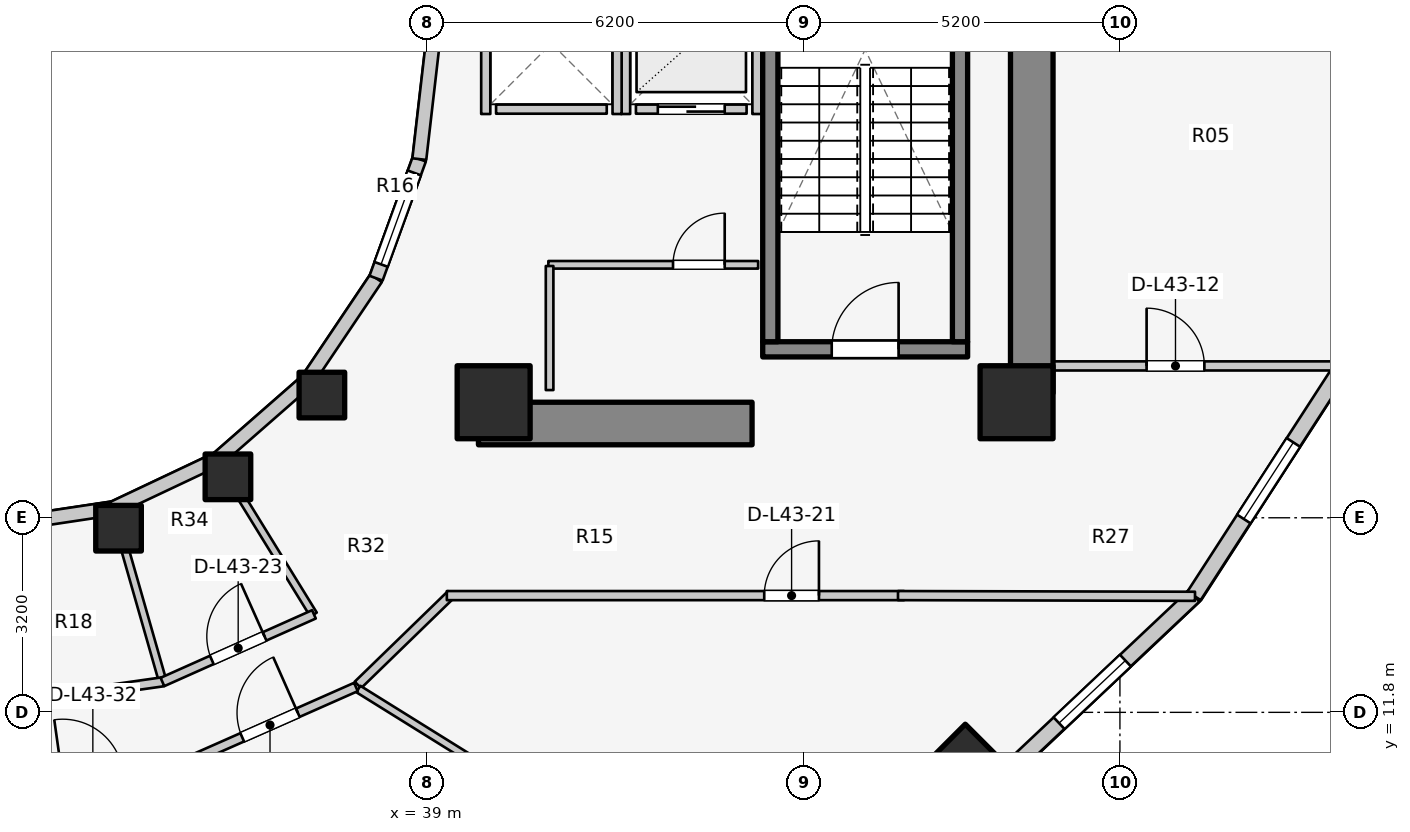
"""IFC4 building model, lengths in metres.
Left out: names, types, materials, properties, quantities, classifications, styles, units other than length and angle.
Written with IfcOpenShell. Run it as: python <this file> out.ifc"""

import sys

from ifc_helpers import new_model, si_unit, direction, frame, frame_2d, origin, origin_2d, place, context, subcontext, project, spatial, rectangle, extrude, element, fill, save


model = new_model("IFC4")
c1 = context("Model", 3, precision=1e-05, world=origin(), true_north=direction((0.0, 1.0)))
c2 = subcontext(c1, "Body", "Model", "MODEL_VIEW")
j1 = project(units=[si_unit("LENGTHUNIT", "METRE"), si_unit("PLANEANGLEUNIT", "RADIAN")], contexts=[c1])
p1 = place(None, origin())
s1 = spatial("IfcSite", under=j1, at=p1, CompositionType="ELEMENT")
p2 = place(p1, origin())
s2 = spatial("IfcBuilding", under=s1, at=p2, CompositionType="ELEMENT")
p3 = place(p2, frame((0.0, 0.0, 143.6)))
s3 = spatial("IfcBuildingStorey", under=s2, at=p3, CompositionType="ELEMENT", Elevation=143.6)
p4 = place(p3, frame((48.95, 17.05, 0.0), z_axis=(0.0, 0.0, 1.0), x_axis=(0.0, 1.0, 0.0)))
e1 = element("IfcWall", 1, at=p4, inside=s3, PredefinedType="SHEAR", context=c2, shape_type="SweptSolid", body=[
    extrude(rectangle(XDim=12.8, YDim=0.7, at=frame_2d((6.4, 0.0))), origin(), (0.0, 0.0, 1.0), 3.1),
])
p5 = place(p3, frame((39.85, 16.55, 0.0), z_axis=(0.0, 0.0, 1.0), x_axis=(1.0, 0.0, 0.0)))
e2 = element("IfcWall", 2, at=p5, inside=s3, PredefinedType="SHEAR", context=c2, shape_type="SweptSolid", body=[
    extrude(rectangle(XDim=4.5, YDim=0.7, at=frame_2d((2.25, 0.0))), origin(), (0.0, 0.0, 1.0), 3.1),
])
p6 = place(p3, frame((44.525, 17.77, 0.0), z_axis=(0.0, 0.0, 1.0), x_axis=(1.0, 0.0, 0.0)))
e3 = element("IfcWall", 3, at=p6, inside=s3, PredefinedType="SOLIDWALL", context=c2, shape_type="SweptSolid", body=[
    extrude(rectangle(XDim=3.37, YDim=0.25, at=frame_2d((1.685, 0.0))), origin(), (0.0, 0.0, 1.0), 3.1),
])
p7 = place(p6, frame((1.135, 0.0, 0.0)))
e4 = element("IfcOpeningElement", 4, at=p7, cuts=e3, PredefinedType="OPENING", context=c2, shape_type="SweptSolid", body=[
    extrude(rectangle(XDim=1.1, YDim=2.1, at=frame_2d((0.55, 1.05))), frame((0.0, 0.135, 0.0), z_axis=(0.0, -1.0, 0.0), x_axis=(1.0, 0.0, 0.0)), (0.0, 0.0, 1.0), 0.27),
])
for number, where, z_axis, x_axis in (
    (5, (44.65, 17.895, 0.0), (0.0, 0.0, 1.0), (0.0, 1.0, 0.0)),
    (6, (47.77, 17.895, 0.0), (0.0, 0.0, 1.0), (0.0, 1.0, 0.0)),
):
    element("IfcWall", number, at=place(p3, frame(where, z_axis=z_axis, x_axis=x_axis)), inside=s3, PredefinedType="SOLIDWALL", context=c2, shape_type="SweptSolid", body=[
        extrude(rectangle(XDim=7.81, YDim=0.25, at=frame_2d((3.905, 0.0))), origin(), (0.0, 0.0, 1.0), 3.1),
    ])
for number, where, z_axis, x_axis in (
    (7, (40.1, 16.9, 0.0), (0.0, 0.0, 1.0), (1.0, 0.0, 0.0)),
    (8, (48.7, 16.9, 0.0), (0.0, 0.0, 1.0), (1.0, 0.0, 0.0)),
):
    element("IfcColumn", number, at=place(p3, frame(where, z_axis=z_axis, x_axis=x_axis)), inside=s3, PredefinedType="COLUMN", context=c2, shape_type="SweptSolid", body=[
        extrude(rectangle(XDim=1.2, YDim=1.2, at=origin_2d()), origin(), (0.0, 0.0, 1.0), 3.1),
    ])
for number, where, z_axis, x_axis in (
    (9, (33.931, 14.828, 0.0), (0.0, 0.0, 1.0), (1.0, 0.0, 0.0)),
    (10, (35.73, 15.673, 0.0), (0.0, 0.0, 1.0), (1.0, 0.0, 0.0)),
    (11, (37.275, 17.018, 0.0), (0.0, 0.0, 1.0), (1.0, 0.0, 0.0)),
):
    element("IfcColumn", number, at=place(p3, frame(where, z_axis=z_axis, x_axis=x_axis)), inside=s3, PredefinedType="COLUMN", context=c2, shape_type="SweptSolid", body=[
        extrude(rectangle(XDim=0.75, YDim=0.75, at=origin_2d()), origin(), (0.0, 0.0, 1.0), 3.1),
    ])
p8 = place(p3, frame((47.857, 10.969, 0.0), z_axis=(0.0, 0.0, 1.0), x_axis=(0.707106781187, -0.707106781187, 0.0)))
e12 = element("IfcColumn", 12, at=p8, inside=s3, PredefinedType="COLUMN", context=c2, shape_type="SweptSolid", body=[
    extrude(rectangle(XDim=0.9, YDim=0.9, at=origin_2d()), origin(), (0.0, 0.0, 1.0), 3.1),
])
p9 = place(p3, frame((32.0, 14.88, 0.0), z_axis=(0.0, 0.0, 1.0), x_axis=(0.988901730308, 0.148571086668, 0.0)))
e13 = element("IfcWall", 13, at=p9, inside=s3, PredefinedType="STANDARD", context=c2, shape_type="SweptSolid", body=[
    extrude(rectangle(XDim=1.864, YDim=0.23, at=frame_2d((0.932, 0.0))), origin(), (0.0, 0.0, 1.0), 2.16),
])
p10 = place(p3, frame((33.843, 15.157, 0.0), z_axis=(0.0, 0.0, 1.0), x_axis=(0.904179699603, 0.427152280606, 0.0)))
e14 = element("IfcWall", 14, at=p10, inside=s3, PredefinedType="STANDARD", context=c2, shape_type="SweptSolid", body=[
    extrude(rectangle(XDim=1.899, YDim=0.23, at=frame_2d((0.95, 0.0))), origin(), (0.0, 0.0, 1.0), 2.16),
])
p11 = place(p3, frame((35.56, 15.968, 0.0), z_axis=(0.0, 0.0, 1.0), x_axis=(0.752576694707, 0.658504607869, 0.0)))
e15 = element("IfcWall", 15, at=p11, inside=s3, PredefinedType="STANDARD", context=c2, shape_type="SweptSolid", body=[
    extrude(rectangle(XDim=1.959, YDim=0.23, at=frame_2d((0.98, 0.0))), origin(), (0.0, 0.0, 1.0), 2.16),
])
p12 = place(p3, frame((37.035, 17.258, 0.0), z_axis=(0.0, 0.0, 1.0), x_axis=(0.558197800898, 0.829707909492, 0.0)))
e16 = element("IfcWall", 16, at=p12, inside=s3, PredefinedType="STANDARD", context=c2, shape_type="SweptSolid", body=[
    extrude(rectangle(XDim=2.027, YDim=0.23, at=frame_2d((1.013, 0.0))), origin(), (0.0, 0.0, 1.0), 2.16),
])
p13 = place(p3, frame((38.166, 18.94, 0.0), z_axis=(0.0, 0.0, 1.0), x_axis=(0.341423187295, 0.93990968033, 0.0)))
e17 = element("IfcWall", 17, at=p13, inside=s3, PredefinedType="STANDARD", context=c2, shape_type="SweptSolid", body=[
    extrude(rectangle(XDim=2.084, YDim=0.23, at=frame_2d((1.042, 0.0))), origin(), (0.0, 0.0, 1.0), 2.84),
])
p14 = place(p13, frame((0.242, 0.0, 0.85)))
e18 = element("IfcOpeningElement", 18, at=p14, cuts=e17, PredefinedType="OPENING", context=c2, shape_type="SweptSolid", body=[
    extrude(rectangle(XDim=1.6, YDim=1.65, at=frame_2d((0.8, 0.825))), frame((0.0, 0.125, 0.0), z_axis=(0.0, -1.0, 0.0), x_axis=(1.0, 0.0, 0.0)), (0.0, 0.0, 1.0), 0.25),
])
p15 = place(p3, frame((38.877, 20.898, 0.0), z_axis=(0.0, 0.0, 1.0), x_axis=(0.114711713601, 0.993398823617, 0.0)))
e19 = element("IfcWall", 19, at=p15, inside=s3, PredefinedType="STANDARD", context=c2, shape_type="SweptSolid", body=[
    extrude(rectangle(XDim=2.115, YDim=0.23, at=frame_2d((1.058, 0.0))), origin(), (0.0, 0.0, 1.0), 2.84),
])
p16 = place(p3, frame((48.269, 10.559, 0.0), z_axis=(0.0, 0.0, 1.0), x_axis=(0.727667301037, 0.68593024354, 0.0)))
e20 = element("IfcWall", 20, at=p16, inside=s3, PredefinedType="STANDARD", context=c2, shape_type="SweptSolid", body=[
    extrude(rectangle(XDim=4.604, YDim=0.26, at=frame_2d((2.302, 0.0))), origin(), (0.0, 0.0, 1.0), 2.85),
])
p17 = place(p16, frame((1.552, 0.0, 0.75)))
e21 = element("IfcOpeningElement", 21, at=p17, cuts=e20, PredefinedType="OPENING", context=c2, shape_type="SweptSolid", body=[
    extrude(rectangle(XDim=1.5, YDim=1.6, at=frame_2d((0.75, 0.8))), frame((0.0, 0.14, 0.0), z_axis=(0.0, -1.0, 0.0), x_axis=(1.0, 0.0, 0.0)), (0.0, 0.0, 1.0), 0.28),
])
p18 = place(p3, frame((51.619, 13.716, 0.0), z_axis=(0.0, 0.0, 1.0), x_axis=(0.543358984534, 0.839500454989, 0.0)))
e22 = element("IfcWall", 22, at=p18, inside=s3, PredefinedType="STANDARD", context=c2, shape_type="SweptSolid", body=[
    extrude(rectangle(XDim=4.511, YDim=0.26, at=frame_2d((2.256, 0.0))), origin(), (0.0, 0.0, 1.0), 2.85),
])
p19 = place(p18, frame((1.506, 0.0, 0.75)))
e23 = element("IfcOpeningElement", 23, at=p19, cuts=e22, PredefinedType="OPENING", context=c2, shape_type="SweptSolid", body=[
    extrude(rectangle(XDim=1.5, YDim=1.6, at=frame_2d((0.75, 0.8))), frame((0.0, 0.14, 0.0), z_axis=(0.0, -1.0, 0.0), x_axis=(1.0, 0.0, 0.0)), (0.0, 0.0, 1.0), 0.28),
])
p20 = place(p3, frame((42.44, 21.72, 0.0), z_axis=(0.0, 0.0, 1.0), x_axis=(1.0, 0.0, 0.0)))
e24 = element("IfcWall", 24, at=p20, inside=s3, PredefinedType="SOLIDWALL", context=c2, shape_type="SweptSolid", body=[
    extrude(rectangle(XDim=1.82, YDim=0.15, at=frame_2d((0.91, 0.0))), origin(), (0.0, 0.0, 1.0), 2.855),
])
p21 = place(p20, frame((0.36, 0.0, 0.0)))
e25 = element("IfcOpeningElement", 25, at=p21, cuts=e24, PredefinedType="OPENING", context=c2, shape_type="SweptSolid", body=[
    extrude(rectangle(XDim=1.1, YDim=2.1, at=frame_2d((0.55, 1.05))), frame((0.0, 0.085, 0.0), z_axis=(0.0, -1.0, 0.0), x_axis=(1.0, 0.0, 0.0)), (0.0, 0.0, 1.0), 0.17),
])
for number, where, z_axis, x_axis in (
    (26, (42.27, 21.64, 0.0), (0.0, 0.0, 1.0), (0.0, 1.0, 0.0)),
    (27, (44.43, 21.64, 0.0), (0.0, 0.0, 1.0), (0.0, 1.0, 0.0)),
):
    element("IfcWall", number, at=place(p3, frame(where, z_axis=z_axis, x_axis=x_axis)), inside=s3, PredefinedType="SOLIDWALL", context=c2, shape_type="SweptSolid", body=[
        extrude(rectangle(XDim=2.32, YDim=0.15, at=frame_2d((1.16, 0.0))), origin(), (0.0, 0.0, 1.0), 2.855),
    ])
p22 = place(p3, frame((40.14, 21.72, 0.0), z_axis=(0.0, 0.0, 1.0), x_axis=(1.0, 0.0, 0.0)))
e28 = element("IfcWall", 28, at=p22, inside=s3, PredefinedType="SOLIDWALL", context=c2, shape_type="SweptSolid", body=[
    extrude(rectangle(XDim=1.82, YDim=0.15, at=frame_2d((0.91, 0.0))), origin(), (0.0, 0.0, 1.0), 2.12),
])
p23 = place(p3, frame((39.97, 21.64, 0.0), z_axis=(0.0, 0.0, 1.0), x_axis=(0.0, 1.0, 0.0)))
e29 = element("IfcWall", 29, at=p23, inside=s3, PredefinedType="SOLIDWALL", context=c2, shape_type="SweptSolid", body=[
    extrude(rectangle(XDim=2.32, YDim=0.15, at=frame_2d((1.16, 0.0))), origin(), (0.0, 0.0, 1.0), 2.12),
])
p24 = place(p3, frame((42.13, 21.64, 0.0), z_axis=(0.0, 0.0, 1.0), x_axis=(0.0, 1.0, 0.0)))
e30 = element("IfcWall", 30, at=p24, inside=s3, PredefinedType="SOLIDWALL", context=c2, shape_type="SweptSolid", body=[
    extrude(rectangle(XDim=2.32, YDim=0.15, at=frame_2d((1.16, 0.0))), origin(), (0.0, 0.0, 1.0), 2.855),
])
p25 = place(p3, frame((41.0, 19.16, 0.0), z_axis=(0.0, 0.0, 1.0), x_axis=(1.0, 0.0, 0.0)))
e31 = element("IfcWall", 31, at=p25, inside=s3, PredefinedType="PARTITIONING", context=c2, shape_type="SweptSolid", body=[
    extrude(rectangle(XDim=3.45, YDim=0.125, at=frame_2d((1.725, 0.0))), origin(), (0.0, 0.0, 1.0), 2.12),
])
p26 = place(p25, frame((2.05, 0.0, 0.0)))
e32 = element("IfcOpeningElement", 32, at=p26, cuts=e31, PredefinedType="OPENING", context=c2, shape_type="SweptSolid", body=[
    extrude(rectangle(XDim=0.85, YDim=2.05, at=frame_2d((0.425, 1.025))), frame((0.0, 0.073, 0.0), z_axis=(0.0, -1.0, 0.0), x_axis=(1.0, 0.0, 0.0)), (0.0, 0.0, 1.0), 0.145),
])
p27 = place(p3, frame((41.02, 17.1, 0.0), z_axis=(0.0, 0.0, 1.0), x_axis=(0.0, 1.0, 0.0)))
e33 = element("IfcWall", 33, at=p27, inside=s3, PredefinedType="PARTITIONING", context=c2, shape_type="SweptSolid", body=[
    extrude(rectangle(XDim=2.04, YDim=0.125, at=frame_2d((1.02, 0.0))), origin(), (0.0, 0.0, 1.0), 2.855),
])
p28 = place(p3, frame((48.95, 17.497, 0.0), z_axis=(0.0, 0.0, 1.0), x_axis=(1.0, 0.0, 0.0)))
e34 = element("IfcWall", 34, at=p28, inside=s3, PredefinedType="PARTITIONING", context=c2, shape_type="SweptSolid", body=[
    extrude(rectangle(XDim=5.14, YDim=0.15, at=frame_2d((2.57, 0.0))), origin(), (0.0, 0.0, 1.0), 2.855),
])
p29 = place(p28, frame((1.889, 0.0, 0.0)))
e35 = element("IfcOpeningElement", 35, at=p29, cuts=e34, PredefinedType="OPENING", context=c2, shape_type="SweptSolid", body=[
    extrude(rectangle(XDim=0.95, YDim=2.1, at=frame_2d((0.475, 1.05))), frame((0.0, 0.085, 0.0), z_axis=(0.0, -1.0, 0.0), x_axis=(1.0, 0.0, 0.0)), (0.0, 0.0, 1.0), 0.17),
])
p30 = place(p3, frame((37.867, 12.251, 0.0), z_axis=(0.0, 0.0, 1.0), x_axis=(0.717419568599, 0.696641344302, 0.0)))
e36 = element("IfcWall", 36, at=p30, inside=s3, PredefinedType="PARTITIONING", context=c2, shape_type="SweptSolid", body=[
    extrude(rectangle(XDim=2.138, YDim=0.15, at=frame_2d((1.069, 0.0))), origin(), (0.0, 0.0, 1.0), 2.299),
])
p31 = place(p3, frame((39.33, 13.72, 0.0), z_axis=(0.0, 0.0, 1.0), x_axis=(1.0, 0.0, 0.0)))
e37 = element("IfcWall", 37, at=p31, inside=s3, PredefinedType="PARTITIONING", context=c2, shape_type="SweptSolid", body=[
    extrude(rectangle(XDim=7.52, YDim=0.15, at=frame_2d((3.76, 0.0))), origin(), (0.0, 0.0, 1.0), 2.299),
])
p32 = place(p31, frame((5.22, 0.0, 0.0)))
e38 = element("IfcOpeningElement", 38, at=p32, cuts=e37, PredefinedType="OPENING", context=c2, shape_type="SweptSolid", body=[
    extrude(rectangle(XDim=0.9, YDim=2.1, at=frame_2d((0.45, 1.05))), frame((0.0, 0.085, 0.0), z_axis=(0.0, -1.0, 0.0), x_axis=(1.0, 0.0, 0.0)), (0.0, 0.0, 1.0), 0.17),
])
p33 = place(p3, frame((46.75, 13.72, 0.0), z_axis=(0.0, 0.0, 1.0), x_axis=(0.999997122315, -0.00239903348, 0.0)))
e39 = element("IfcWall", 39, at=p33, inside=s3, PredefinedType="PARTITIONING", context=c2, shape_type="SweptSolid", body=[
    extrude(rectangle(XDim=4.885, YDim=0.15, at=frame_2d((2.442, 0.0))), origin(), (0.0, 0.0, 1.0), 2.22),
])
p34 = place(p3, frame((33.838, 15.176, 0.0), z_axis=(0.0, 0.0, 1.0), x_axis=(0.274947609893, -0.961459209647, 0.0)))
e40 = element("IfcWall", 40, at=p34, inside=s3, PredefinedType="PARTITIONING", context=c2, shape_type="SweptSolid", body=[
    extrude(rectangle(XDim=2.99, YDim=0.125, at=frame_2d((1.495, 0.0))), origin(), (0.0, 0.0, 1.0), 2.299),
])
p35 = place(p3, frame((35.55, 15.985, 0.0), z_axis=(0.0, 0.0, 1.0), x_axis=(0.524565340045, -0.851370192116, 0.0)))
e41 = element("IfcWall", 41, at=p35, inside=s3, PredefinedType="PARTITIONING", context=c2, shape_type="SweptSolid", body=[
    extrude(rectangle(XDim=3.027, YDim=0.125, at=frame_2d((1.514, 0.0))), origin(), (0.0, 0.0, 1.0), 2.299),
])
p36 = place(p3, frame((31.998, 11.924, 0.0), z_axis=(0.0, 0.0, 1.0), x_axis=(0.990041682628, 0.140774524184, 0.0)))
e42 = element("IfcWall", 42, at=p36, inside=s3, PredefinedType="PARTITIONING", context=c2, shape_type="SweptSolid", body=[
    extrude(rectangle(XDim=2.695, YDim=0.15, at=frame_2d((1.348, 0.0))), origin(), (0.0, 0.0, 1.0), 2.299),
])
p37 = place(p3, frame((34.653, 12.299, 0.0), z_axis=(0.0, 0.0, 1.0), x_axis=(0.913112902883, 0.407706789971, 0.0)))
e43 = element("IfcWall", 43, at=p37, inside=s3, PredefinedType="PARTITIONING", context=c2, shape_type="SweptSolid", body=[
    extrude(rectangle(XDim=2.729, YDim=0.15, at=frame_2d((1.364, 0.0))), origin(), (0.0, 0.0, 1.0), 2.299),
])
p38 = place(p37, frame((0.889, 0.0, 0.0)))
e44 = element("IfcOpeningElement", 44, at=p38, cuts=e43, PredefinedType="OPENING", context=c2, shape_type="SweptSolid", body=[
    extrude(rectangle(XDim=0.95, YDim=2.1, at=frame_2d((0.475, 1.05))), frame((0.0, 0.085, 0.0), z_axis=(0.0, -1.0, 0.0), x_axis=(1.0, 0.0, 0.0)), (0.0, 0.0, 1.0), 0.17),
])
p39 = place(p3, frame((37.875, 12.184, 0.0), z_axis=(0.0, 0.0, 1.0), x_axis=(0.849008457073, -0.528379257559, 0.0)))
e45 = element("IfcWall", 45, at=p39, inside=s3, PredefinedType="PARTITIONING", context=c2, shape_type="SweptSolid", body=[
    extrude(rectangle(XDim=7.077, YDim=0.125, at=frame_2d((3.539, 0.0))), origin(), (0.0, 0.0, 1.0), 2.299),
])
p40 = place(p3, frame((35.009, 10.966, 0.0), z_axis=(0.0, 0.0, 1.0), x_axis=(0.91445214467, 0.404694051239, 0.0)))
e46 = element("IfcWall", 46, at=p40, inside=s3, PredefinedType="PARTITIONING", context=c2, shape_type="SweptSolid", body=[
    extrude(rectangle(XDim=3.091, YDim=0.15, at=frame_2d((1.545, 0.0))), origin(), (0.0, 0.0, 1.0), 2.299),
])
p41 = place(p40, frame((1.045, 0.0, 0.0)))
e47 = element("IfcOpeningElement", 47, at=p41, cuts=e46, PredefinedType="OPENING", context=c2, shape_type="SweptSolid", body=[
    extrude(rectangle(XDim=1.0, YDim=2.1, at=frame_2d((0.5, 1.05))), frame((0.0, 0.085, 0.0), z_axis=(0.0, -1.0, 0.0), x_axis=(1.0, 0.0, 0.0)), (0.0, 0.0, 1.0), 0.17),
])
p42 = place(p14, origin())
e48 = element("IfcWindow", 48, at=p42, inside=s3, PartitioningType="SINGLE_PANEL", PredefinedType="WINDOW", context=c2, shape_type="SweptSolid", body=[
    extrude(rectangle(XDim=1.6, YDim=1.65, at=frame_2d((0.8, 0.825))), frame((0.0, 0.03, 0.0), z_axis=(0.0, -1.0, 0.0), x_axis=(1.0, 0.0, 0.0)), (0.0, 0.0, 1.0), 0.06),
])
fill(e18, e48)
p43 = place(p17, origin())
e49 = element("IfcWindow", 49, at=p43, inside=s3, PartitioningType="SINGLE_PANEL", PredefinedType="WINDOW", context=c2, shape_type="SweptSolid", body=[
    extrude(rectangle(XDim=1.5, YDim=1.6, at=frame_2d((0.75, 0.8))), frame((0.0, 0.03, 0.0), z_axis=(0.0, -1.0, 0.0), x_axis=(1.0, 0.0, 0.0)), (0.0, 0.0, 1.0), 0.06),
])
fill(e21, e49)
p44 = place(p19, origin())
e50 = element("IfcWindow", 50, at=p44, inside=s3, PartitioningType="SINGLE_PANEL", PredefinedType="WINDOW", context=c2, shape_type="SweptSolid", body=[
    extrude(rectangle(XDim=1.5, YDim=1.6, at=frame_2d((0.75, 0.8))), frame((0.0, 0.03, 0.0), z_axis=(0.0, -1.0, 0.0), x_axis=(1.0, 0.0, 0.0)), (0.0, 0.0, 1.0), 0.06),
])
fill(e23, e50)
p45 = place(p7, origin())
e51 = element("IfcDoor", 51, at=p45, inside=s3, OperationType="SINGLE_SWING_RIGHT", PredefinedType="DOOR", context=c2, shape_type="SweptSolid", body=[
    extrude(rectangle(XDim=1.1, YDim=2.1, at=frame_2d((0.55, 1.05))), frame((0.0, 0.025, 0.0), z_axis=(0.0, -1.0, 0.0), x_axis=(1.0, 0.0, 0.0)), (0.0, 0.0, 1.0), 0.05),
])
fill(e4, e51)
p46 = place(p21, origin())
e52 = element("IfcDoor", 52, at=p46, inside=s3, OperationType="DOUBLE_DOOR_SLIDING", PredefinedType="DOOR", context=c2, shape_type="SweptSolid", body=[
    extrude(rectangle(XDim=1.1, YDim=2.1, at=frame_2d((0.55, 1.05))), frame((0.0, 0.025, 0.0), z_axis=(0.0, -1.0, 0.0), x_axis=(1.0, 0.0, 0.0)), (0.0, 0.0, 1.0), 0.05),
])
fill(e25, e52)
p47 = place(p26, origin())
e53 = element("IfcDoor", 53, at=p47, inside=s3, OperationType="SINGLE_SWING_RIGHT", PredefinedType="DOOR", context=c2, shape_type="SweptSolid", body=[
    extrude(rectangle(XDim=0.85, YDim=2.05, at=frame_2d((0.425, 1.025))), frame((0.0, 0.025, 0.0), z_axis=(0.0, -1.0, 0.0), x_axis=(1.0, 0.0, 0.0)), (0.0, 0.0, 1.0), 0.05),
])
fill(e32, e53)
p48 = place(p29, origin())
e54 = element("IfcDoor", 54, at=p48, inside=s3, OperationType="SINGLE_SWING_LEFT", PredefinedType="DOOR", context=c2, shape_type="SweptSolid", body=[
    extrude(rectangle(XDim=0.95, YDim=2.1, at=frame_2d((0.475, 1.05))), frame((0.0, 0.025, 0.0), z_axis=(0.0, -1.0, 0.0), x_axis=(1.0, 0.0, 0.0)), (0.0, 0.0, 1.0), 0.05),
])
fill(e35, e54)
p49 = place(p32, origin())
e55 = element("IfcDoor", 55, at=p49, inside=s3, OperationType="SINGLE_SWING_RIGHT", PredefinedType="DOOR", context=c2, shape_type="SweptSolid", body=[
    extrude(rectangle(XDim=0.9, YDim=2.1, at=frame_2d((0.45, 1.05))), frame((0.0, 0.025, 0.0), z_axis=(0.0, -1.0, 0.0), x_axis=(1.0, 0.0, 0.0)), (0.0, 0.0, 1.0), 0.05),
])
fill(e38, e55)
p50 = place(p38, origin())
e56 = element("IfcDoor", 56, at=p50, inside=s3, OperationType="SINGLE_SWING_RIGHT", PredefinedType="DOOR", context=c2, shape_type="SweptSolid", body=[
    extrude(rectangle(XDim=0.95, YDim=2.1, at=frame_2d((0.475, 1.05))), frame((0.0, 0.025, 0.0), z_axis=(0.0, -1.0, 0.0), x_axis=(1.0, 0.0, 0.0)), (0.0, 0.0, 1.0), 0.05),
])
fill(e44, e56)
p51 = place(p41, origin())
e57 = element("IfcDoor", 57, at=p51, inside=s3, OperationType="SINGLE_SWING_RIGHT", PredefinedType="DOOR", context=c2, shape_type="SweptSolid", body=[
    extrude(rectangle(XDim=1.0, YDim=2.1, at=frame_2d((0.5, 1.05))), frame((0.0, 0.025, 0.0), z_axis=(0.0, -1.0, 0.0), x_axis=(1.0, 0.0, 0.0)), (0.0, 0.0, 1.0), 0.05),
])
fill(e47, e57)
save(model, sys.argv[1])
